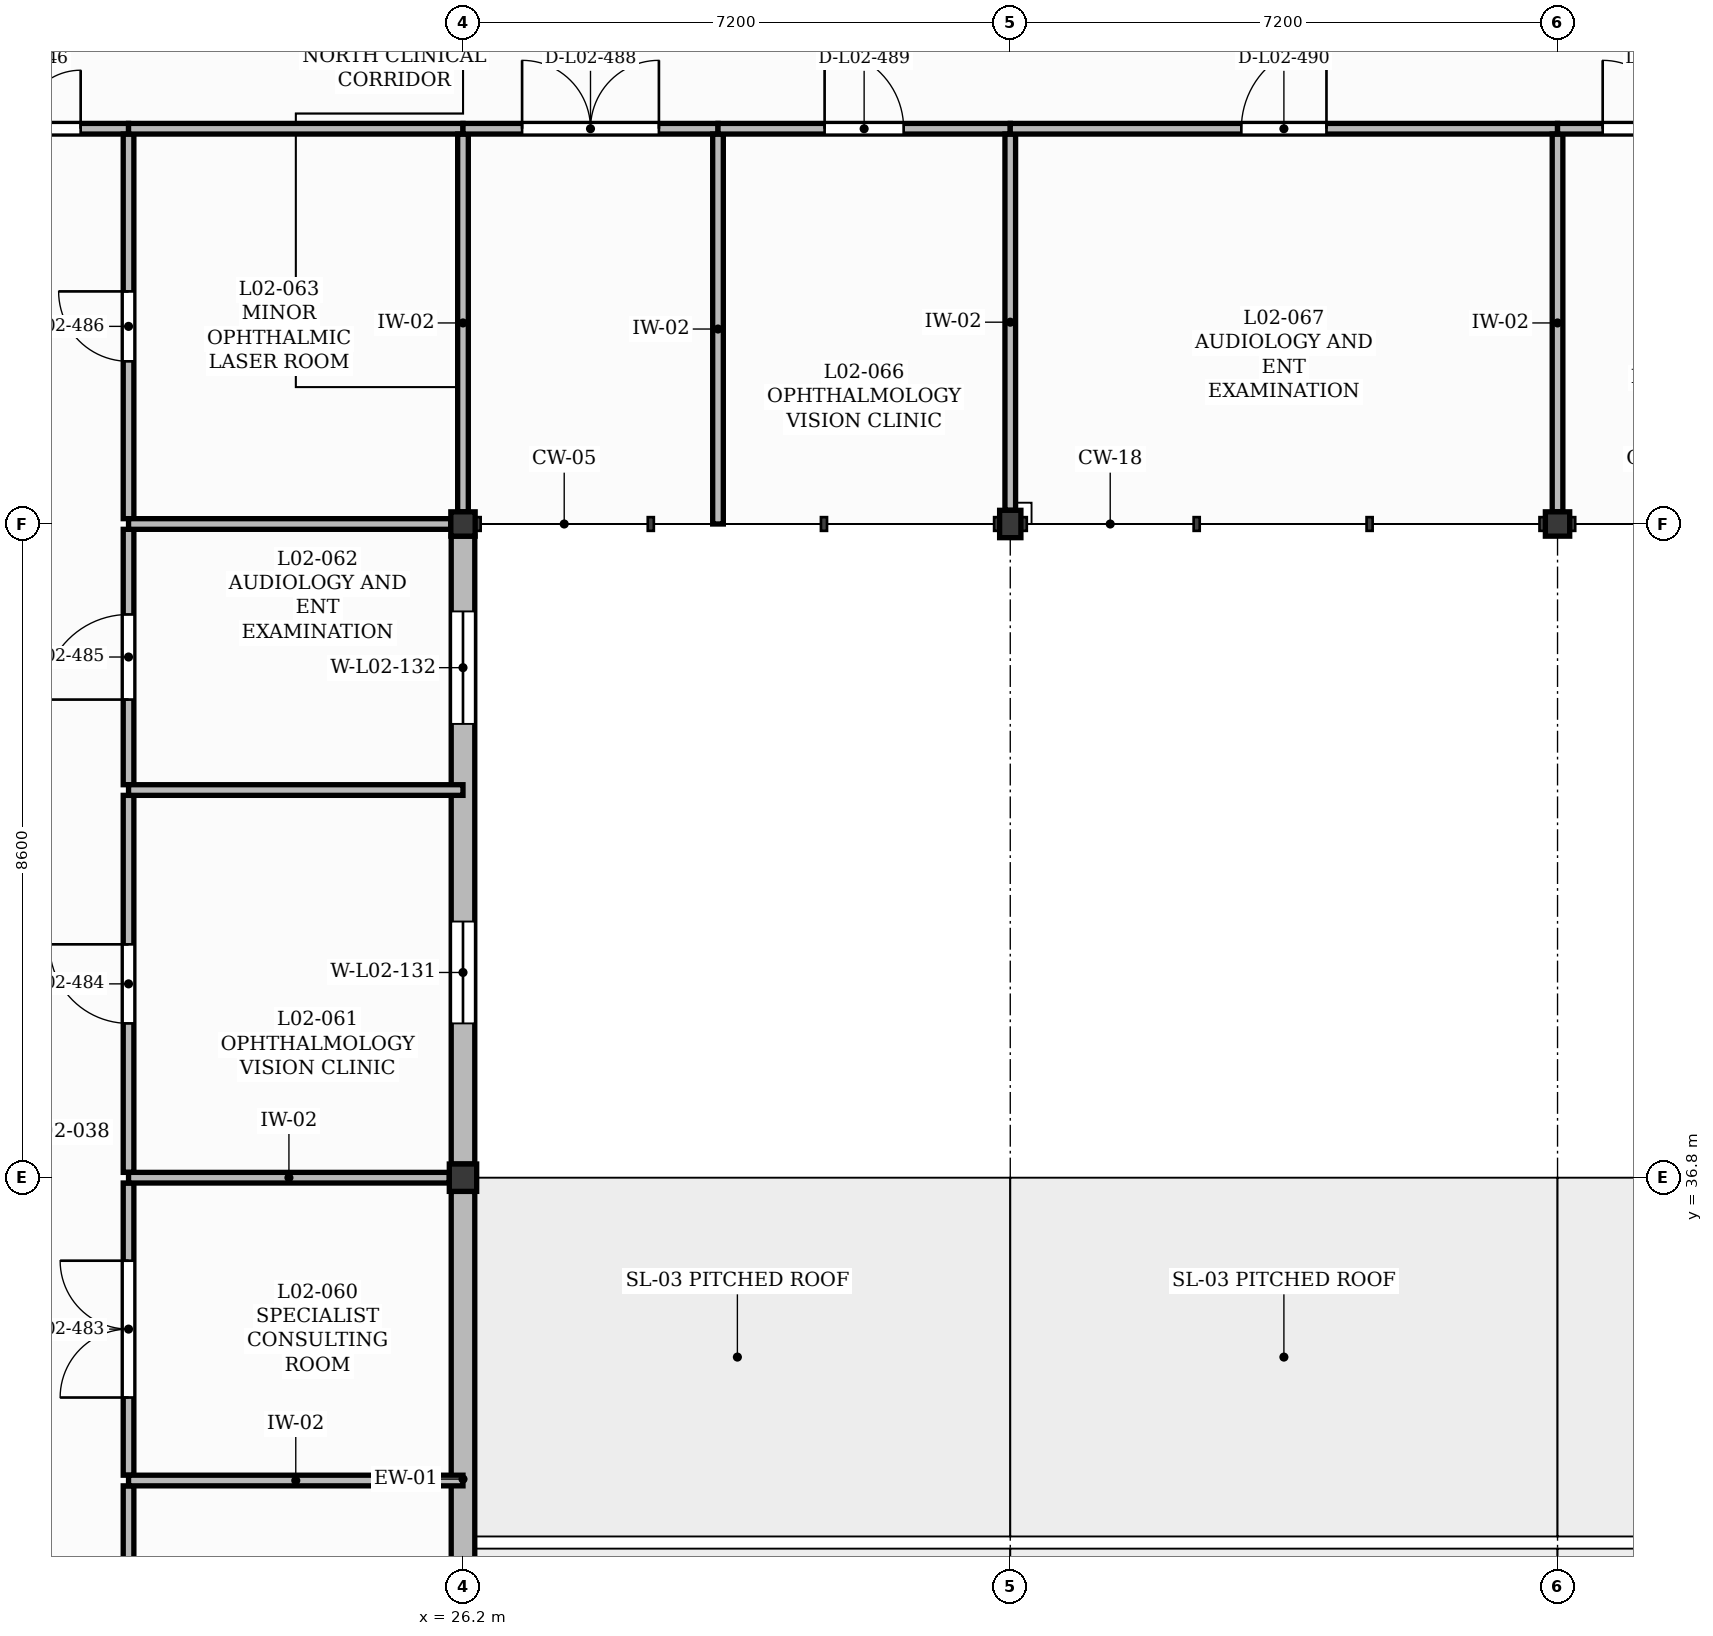
"""IFC4 building model, lengths in metres.
Left out: names, types, materials, properties, quantities, classifications, styles, units other than length and angle.
Written with IfcOpenShell. Run it as: python <this file> out.ifc"""

import sys

from ifc_helpers import new_model, si_unit, direction, frame, frame_2d, origin, origin_2d, place, context, subcontext, project, spatial, rectangle, extrude, element, fill, save


model = new_model("IFC4")
c1 = context("Model", 3, precision=1e-05, world=origin(), true_north=direction((0.0, 1.0)))
c2 = subcontext(c1, "Body", "Model", "MODEL_VIEW")
j1 = project(units=[si_unit("LENGTHUNIT", "METRE"), si_unit("PLANEANGLEUNIT", "RADIAN")], contexts=[c1])
p1 = place(None, origin())
s1 = spatial("IfcSite", under=j1, at=p1, CompositionType="ELEMENT")
p2 = place(p1, origin())
s2 = spatial("IfcBuilding", under=s1, at=p2, CompositionType="ELEMENT")
p3 = place(p2, frame((0.0, 0.0, 9.0)))
s3 = spatial("IfcBuildingStorey", under=s2, at=p3, CompositionType="ELEMENT", Elevation=9.0)
p4 = place(p3, frame((26.2, 36.8, 0.0), z_axis=(0.0, 0.0, 1.0), x_axis=(1.0, 0.0, 0.0)))
e1 = element("IfcColumn", 1, at=p4, inside=s3, PredefinedType="COLUMN", context=c2, shape_type="SweptSolid", body=[
    extrude(rectangle(XDim=0.36, YDim=0.36, at=origin_2d()), origin(), (0.0, 0.0, 1.0), 3.95),
])
p5 = place(p3, frame((26.2, 45.4, 0.0), z_axis=(0.0, 0.0, 1.0), x_axis=(1.0, 0.0, 0.0)))
e2 = element("IfcColumn", 2, at=p5, inside=s3, PredefinedType="COLUMN", context=c2, shape_type="SweptSolid", body=[
    extrude(rectangle(XDim=0.32, YDim=0.32, at=origin_2d()), origin(), (0.0, 0.0, 1.0), 3.95),
])
p6 = place(p3, frame((33.4, 45.4, 0.0), z_axis=(0.0, 0.0, 1.0), x_axis=(1.0, 0.0, 0.0)))
e3 = element("IfcColumn", 3, at=p6, inside=s3, PredefinedType="COLUMN", context=c2, shape_type="SweptSolid", body=[
    extrude(rectangle(XDim=0.28, YDim=0.36, at=origin_2d()), origin(), (0.0, 0.0, 1.0), 3.99),
])
p7 = place(p3, frame((40.6, 45.4, 0.0), z_axis=(0.0, 0.0, 1.0), x_axis=(1.0, 0.0, 0.0)))
e4 = element("IfcColumn", 4, at=p7, inside=s3, PredefinedType="COLUMN", context=c2, shape_type="SweptSolid", body=[
    extrude(rectangle(XDim=0.32, YDim=0.32, at=origin_2d()), origin(), (0.0, 0.0, 1.0), 3.99),
])
p8 = place(p3, frame((26.2, 27.38, 0.0), z_axis=(0.0, 0.0, 1.0), x_axis=(0.0, 1.0, 0.0)))
e5 = element("IfcWall", 5, at=p8, inside=s3, PredefinedType="SOLIDWALL", context=c2, shape_type="SweptSolid", body=[
    extrude(rectangle(XDim=9.24, YDim=0.31, at=frame_2d((4.62, 0.0))), origin(), (0.0, 0.0, 1.0), 3.49),
])
p9 = place(p3, frame((26.2, 36.98, 0.0), z_axis=(0.0, 0.0, 1.0), x_axis=(0.0, 1.0, 0.0)))
e6 = element("IfcWall", 6, at=p9, inside=s3, PredefinedType="SOLIDWALL", context=c2, shape_type="SweptSolid", body=[
    extrude(rectangle(XDim=8.26, YDim=0.31, at=frame_2d((4.13, 0.0))), origin(), (0.0, 0.0, 1.0), 3.49),
])
p10 = place(p9, frame((1.85, 0.0, 1.0)))
e7 = element("IfcOpeningElement", 7, at=p10, cuts=e6, PredefinedType="OPENING", context=c2, shape_type="SweptSolid", body=[
    extrude(rectangle(XDim=1.34, YDim=1.95, at=frame_2d((0.67, 0.975))), frame((0.0, 0.165, 0.0), z_axis=(0.0, -1.0, 0.0), x_axis=(1.0, 0.0, 0.0)), (0.0, 0.0, 1.0), 0.33),
])
p11 = place(p9, frame((5.79, 0.0, 1.0)))
e8 = element("IfcOpeningElement", 8, at=p11, cuts=e6, PredefinedType="OPENING", context=c2, shape_type="SweptSolid", body=[
    extrude(rectangle(XDim=1.48, YDim=1.95, at=frame_2d((0.74, 0.975))), frame((0.0, 0.165, 0.0), z_axis=(0.0, -1.0, 0.0), x_axis=(1.0, 0.0, 0.0)), (0.0, 0.0, 1.0), 0.33),
])
p12 = place(p3, frame((19.0, 50.6, 0.0), z_axis=(0.0, 0.0, 1.0), x_axis=(1.0, 0.0, 0.0)))
e9 = element("IfcWall", 9, at=p12, inside=s3, PredefinedType="PARTITIONING", context=c2, shape_type="SweptSolid", body=[
    extrude(rectangle(XDim=2.8, YDim=0.14, at=frame_2d((1.4, 0.0))), origin(), (0.0, 0.0, 1.0), 3.96),
])
p13 = place(p12, frame((0.63, 0.0, 0.0)))
e10 = element("IfcOpeningElement", 10, at=p13, cuts=e9, PredefinedType="OPENING", context=c2, shape_type="SweptSolid", body=[
    extrude(rectangle(XDim=1.54, YDim=2.25, at=frame_2d((0.77, 1.125))), frame((0.0, 0.08, 0.0), z_axis=(0.0, -1.0, 0.0), x_axis=(1.0, 0.0, 0.0)), (0.0, 0.0, 1.0), 0.16),
])
p14 = place(p3, frame((21.8, 27.27, 0.0), z_axis=(0.0, 0.0, 1.0), x_axis=(0.0, 1.0, 0.0)))
e11 = element("IfcWall", 11, at=p14, inside=s3, PredefinedType="PARTITIONING", context=c2, shape_type="SweptSolid", body=[
    extrude(rectangle(XDim=5.476, YDim=0.14, at=frame_2d((2.738, 0.0))), origin(), (0.0, 0.0, 1.0), 3.96),
])
p15 = place(p14, frame((2.158, 0.0, 0.0)))
e12 = element("IfcOpeningElement", 12, at=p15, cuts=e11, PredefinedType="OPENING", context=c2, shape_type="SweptSolid", body=[
    extrude(rectangle(XDim=1.16, YDim=2.1, at=frame_2d((0.58, 1.05))), frame((0.0, 0.08, 0.0), z_axis=(0.0, -1.0, 0.0), x_axis=(1.0, 0.0, 0.0)), (0.0, 0.0, 1.0), 0.16),
])
p16 = place(p3, frame((21.8, 32.886, 0.0), z_axis=(0.0, 0.0, 1.0), x_axis=(0.0, 1.0, 0.0)))
e13 = element("IfcWall", 13, at=p16, inside=s3, PredefinedType="PARTITIONING", context=c2, shape_type="SweptSolid", body=[
    extrude(rectangle(XDim=3.844, YDim=0.14, at=frame_2d((1.922, 0.0))), origin(), (0.0, 0.0, 1.0), 3.96),
])
p17 = place(p16, frame((1.022, 0.0, 0.0)))
e14 = element("IfcOpeningElement", 14, at=p17, cuts=e13, PredefinedType="OPENING", context=c2, shape_type="SweptSolid", body=[
    extrude(rectangle(XDim=1.8, YDim=2.3, at=frame_2d((0.9, 1.15))), frame((0.0, 0.08, 0.0), z_axis=(0.0, -1.0, 0.0), x_axis=(1.0, 0.0, 0.0)), (0.0, 0.0, 1.0), 0.16),
])
p18 = place(p3, frame((21.8, 32.816, 0.0), z_axis=(0.0, 0.0, 1.0), x_axis=(1.0, 0.0, 0.0)))
e15 = element("IfcWall", 15, at=p18, inside=s3, PredefinedType="PARTITIONING", context=c2, shape_type="SweptSolid", body=[
    extrude(rectangle(XDim=4.4, YDim=0.14, at=frame_2d((2.2, 0.0))), origin(), (0.0, 0.0, 1.0), 3.96),
])
p19 = place(p3, frame((21.8, 36.87, 0.0), z_axis=(0.0, 0.0, 1.0), x_axis=(0.0, 1.0, 0.0)))
e16 = element("IfcWall", 16, at=p19, inside=s3, PredefinedType="PARTITIONING", context=c2, shape_type="SweptSolid", body=[
    extrude(rectangle(XDim=4.96, YDim=0.14, at=frame_2d((2.48, 0.0))), origin(), (0.0, 0.0, 1.0), 3.96),
])
p20 = place(p19, frame((1.96, 0.0, 0.0)))
e17 = element("IfcOpeningElement", 17, at=p20, cuts=e16, PredefinedType="OPENING", context=c2, shape_type="SweptSolid", body=[
    extrude(rectangle(XDim=1.04, YDim=2.1, at=frame_2d((0.52, 1.05))), frame((0.0, 0.08, 0.0), z_axis=(0.0, -1.0, 0.0), x_axis=(1.0, 0.0, 0.0)), (0.0, 0.0, 1.0), 0.16),
])
p21 = place(p3, frame((21.8, 36.8, 0.0), z_axis=(0.0, 0.0, 1.0), x_axis=(1.0, 0.0, 0.0)))
e18 = element("IfcWall", 18, at=p21, inside=s3, PredefinedType="PARTITIONING", context=c2, shape_type="SweptSolid", body=[
    extrude(rectangle(XDim=4.22, YDim=0.14, at=frame_2d((2.11, 0.0))), origin(), (0.0, 0.0, 1.0), 3.49),
])
p22 = place(p3, frame((21.8, 41.97, 0.0), z_axis=(0.0, 0.0, 1.0), x_axis=(0.0, 1.0, 0.0)))
e19 = element("IfcWall", 19, at=p22, inside=s3, PredefinedType="PARTITIONING", context=c2, shape_type="SweptSolid", body=[
    extrude(rectangle(XDim=3.36, YDim=0.14, at=frame_2d((1.68, 0.0))), origin(), (0.0, 0.0, 1.0), 3.96),
])
p23 = place(p22, frame((1.12, 0.0, 0.0)))
e20 = element("IfcOpeningElement", 20, at=p23, cuts=e19, PredefinedType="OPENING", context=c2, shape_type="SweptSolid", body=[
    extrude(rectangle(XDim=1.12, YDim=2.15, at=frame_2d((0.56, 1.075))), frame((0.0, 0.08, 0.0), z_axis=(0.0, -1.0, 0.0), x_axis=(1.0, 0.0, 0.0)), (0.0, 0.0, 1.0), 0.16),
])
p24 = place(p3, frame((21.8, 41.9, 0.0), z_axis=(0.0, 0.0, 1.0), x_axis=(1.0, 0.0, 0.0)))
e21 = element("IfcWall", 21, at=p24, inside=s3, PredefinedType="PARTITIONING", context=c2, shape_type="SweptSolid", body=[
    extrude(rectangle(XDim=4.4, YDim=0.14, at=frame_2d((2.2, 0.0))), origin(), (0.0, 0.0, 1.0), 3.96),
])
p25 = place(p3, frame((21.8, 45.47, 0.0), z_axis=(0.0, 0.0, 1.0), x_axis=(0.0, 1.0, 0.0)))
e22 = element("IfcWall", 22, at=p25, inside=s3, PredefinedType="PARTITIONING", context=c2, shape_type="SweptSolid", body=[
    extrude(rectangle(XDim=5.06, YDim=0.14, at=frame_2d((2.53, 0.0))), origin(), (0.0, 0.0, 1.0), 3.96),
])
p26 = place(p25, frame((2.07, 0.0, 0.0)))
e23 = element("IfcOpeningElement", 23, at=p26, cuts=e22, PredefinedType="OPENING", context=c2, shape_type="SweptSolid", body=[
    extrude(rectangle(XDim=0.92, YDim=2.1, at=frame_2d((0.46, 1.05))), frame((0.0, 0.08, 0.0), z_axis=(0.0, -1.0, 0.0), x_axis=(1.0, 0.0, 0.0)), (0.0, 0.0, 1.0), 0.16),
])
p27 = place(p3, frame((21.8, 45.4, 0.0), z_axis=(0.0, 0.0, 1.0), x_axis=(1.0, 0.0, 0.0)))
e24 = element("IfcWall", 24, at=p27, inside=s3, PredefinedType="PARTITIONING", context=c2, shape_type="SweptSolid", body=[
    extrude(rectangle(XDim=4.24, YDim=0.14, at=frame_2d((2.12, 0.0))), origin(), (0.0, 0.0, 1.0), 3.49),
])
p28 = place(p3, frame((21.8, 50.6, 0.0), z_axis=(0.0, 0.0, 1.0), x_axis=(1.0, 0.0, 0.0)))
e25 = element("IfcWall", 25, at=p28, inside=s3, PredefinedType="PARTITIONING", context=c2, shape_type="SweptSolid", body=[
    extrude(rectangle(XDim=4.4, YDim=0.14, at=frame_2d((2.2, 0.0))), origin(), (0.0, 0.0, 1.0), 3.96),
])
p29 = place(p3, frame((26.2, 45.56, 0.0), z_axis=(0.0, 0.0, 1.0), x_axis=(0.0, 1.0, 0.0)))
e26 = element("IfcWall", 26, at=p29, inside=s3, PredefinedType="PARTITIONING", context=c2, shape_type="SweptSolid", body=[
    extrude(rectangle(XDim=4.97, YDim=0.14, at=frame_2d((2.485, 0.0))), origin(), (0.0, 0.0, 1.0), 3.43),
])
p30 = place(p3, frame((26.2, 50.6, 0.0), z_axis=(0.0, 0.0, 1.0), x_axis=(1.0, 0.0, 0.0)))
e27 = element("IfcWall", 27, at=p30, inside=s3, PredefinedType="PARTITIONING", context=c2, shape_type="SweptSolid", body=[
    extrude(rectangle(XDim=3.355, YDim=0.14, at=frame_2d((1.677, 0.0))), origin(), (0.0, 0.0, 1.0), 3.96),
])
p31 = place(p30, frame((0.778, 0.0, 0.0)))
e28 = element("IfcOpeningElement", 28, at=p31, cuts=e27, PredefinedType="OPENING", context=c2, shape_type="SweptSolid", body=[
    extrude(rectangle(XDim=1.8, YDim=2.3, at=frame_2d((0.9, 1.15))), frame((0.0, 0.08, 0.0), z_axis=(0.0, -1.0, 0.0), x_axis=(1.0, 0.0, 0.0)), (0.0, 0.0, 1.0), 0.16),
])
p32 = place(p3, frame((29.555, 45.4, 0.0), z_axis=(0.0, 0.0, 1.0), x_axis=(0.0, 1.0, 0.0)))
e29 = element("IfcWall", 29, at=p32, inside=s3, PredefinedType="PARTITIONING", context=c2, shape_type="SweptSolid", body=[
    extrude(rectangle(XDim=5.13, YDim=0.14, at=frame_2d((2.565, 0.0))), origin(), (0.0, 0.0, 1.0), 3.96),
])
p33 = place(p3, frame((29.555, 50.6, 0.0), z_axis=(0.0, 0.0, 1.0), x_axis=(1.0, 0.0, 0.0)))
e30 = element("IfcWall", 30, at=p33, inside=s3, PredefinedType="PARTITIONING", context=c2, shape_type="SweptSolid", body=[
    extrude(rectangle(XDim=3.845, YDim=0.14, at=frame_2d((1.922, 0.0))), origin(), (0.0, 0.0, 1.0), 3.96),
])
p34 = place(p33, frame((1.403, 0.0, 0.0)))
e31 = element("IfcOpeningElement", 31, at=p34, cuts=e30, PredefinedType="OPENING", context=c2, shape_type="SweptSolid", body=[
    extrude(rectangle(XDim=1.04, YDim=2.1, at=frame_2d((0.52, 1.05))), frame((0.0, 0.08, 0.0), z_axis=(0.0, -1.0, 0.0), x_axis=(1.0, 0.0, 0.0)), (0.0, 0.0, 1.0), 0.16),
])
p35 = place(p3, frame((33.4, 45.58, 0.0), z_axis=(0.0, 0.0, 1.0), x_axis=(0.0, 1.0, 0.0)))
e32 = element("IfcWall", 32, at=p35, inside=s3, PredefinedType="PARTITIONING", context=c2, shape_type="SweptSolid", body=[
    extrude(rectangle(XDim=4.95, YDim=0.14, at=frame_2d((2.475, 0.0))), origin(), (0.0, 0.0, 1.0), 3.47),
])
p36 = place(p3, frame((33.4, 50.6, 0.0), z_axis=(0.0, 0.0, 1.0), x_axis=(1.0, 0.0, 0.0)))
e33 = element("IfcWall", 33, at=p36, inside=s3, PredefinedType="PARTITIONING", context=c2, shape_type="SweptSolid", body=[
    extrude(rectangle(XDim=7.2, YDim=0.14, at=frame_2d((3.6, 0.0))), origin(), (0.0, 0.0, 1.0), 3.96),
])
p37 = place(p36, frame((3.04, 0.0, 0.0)))
e34 = element("IfcOpeningElement", 34, at=p37, cuts=e33, PredefinedType="OPENING", context=c2, shape_type="SweptSolid", body=[
    extrude(rectangle(XDim=1.12, YDim=2.15, at=frame_2d((0.56, 1.075))), frame((0.0, 0.08, 0.0), z_axis=(0.0, -1.0, 0.0), x_axis=(1.0, 0.0, 0.0)), (0.0, 0.0, 1.0), 0.16),
])
p38 = place(p3, frame((40.6, 45.56, 0.0), z_axis=(0.0, 0.0, 1.0), x_axis=(0.0, 1.0, 0.0)))
e35 = element("IfcWall", 35, at=p38, inside=s3, PredefinedType="PARTITIONING", context=c2, shape_type="SweptSolid", body=[
    extrude(rectangle(XDim=4.97, YDim=0.14, at=frame_2d((2.485, 0.0))), origin(), (0.0, 0.0, 1.0), 3.47),
])
p39 = place(p3, frame((40.6, 50.6, 0.0), z_axis=(0.0, 0.0, 1.0), x_axis=(1.0, 0.0, 0.0)))
e36 = element("IfcWall", 36, at=p39, inside=s3, PredefinedType="PARTITIONING", context=c2, shape_type="SweptSolid", body=[
    extrude(rectangle(XDim=2.988, YDim=0.14, at=frame_2d((1.494, 0.0))), origin(), (0.0, 0.0, 1.0), 3.96),
])
p40 = place(p39, frame((0.594, 0.0, 0.0)))
e37 = element("IfcOpeningElement", 37, at=p40, cuts=e36, PredefinedType="OPENING", context=c2, shape_type="SweptSolid", body=[
    extrude(rectangle(XDim=1.8, YDim=2.3, at=frame_2d((0.9, 1.15))), frame((0.0, 0.08, 0.0), z_axis=(0.0, -1.0, 0.0), x_axis=(1.0, 0.0, 0.0)), (0.0, 0.0, 1.0), 0.16),
])
p41 = place(p10, origin())
e38 = element("IfcWindow", 38, at=p41, inside=s3, PartitioningType="SINGLE_PANEL", PredefinedType="WINDOW", context=c2, shape_type="SweptSolid", body=[
    extrude(rectangle(XDim=1.34, YDim=1.95, at=frame_2d((0.67, 0.975))), frame((0.0, 0.03, 0.0), z_axis=(0.0, -1.0, 0.0), x_axis=(1.0, 0.0, 0.0)), (0.0, 0.0, 1.0), 0.06),
])
fill(e7, e38)
p42 = place(p11, origin())
e39 = element("IfcWindow", 39, at=p42, inside=s3, PartitioningType="SINGLE_PANEL", PredefinedType="WINDOW", context=c2, shape_type="SweptSolid", body=[
    extrude(rectangle(XDim=1.48, YDim=1.95, at=frame_2d((0.74, 0.975))), frame((0.0, 0.03, 0.0), z_axis=(0.0, -1.0, 0.0), x_axis=(1.0, 0.0, 0.0)), (0.0, 0.0, 1.0), 0.06),
])
fill(e8, e39)
p43 = place(p13, origin())
e40 = element("IfcDoor", 40, at=p43, inside=s3, OperationType="DOUBLE_DOOR_SINGLE_SWING", PredefinedType="DOOR", context=c2, shape_type="SweptSolid", body=[
    extrude(rectangle(XDim=1.54, YDim=2.25, at=frame_2d((0.77, 1.125))), frame((0.0, 0.025, 0.0), z_axis=(0.0, -1.0, 0.0), x_axis=(1.0, 0.0, 0.0)), (0.0, 0.0, 1.0), 0.05),
])
fill(e10, e40)
p44 = place(p17, origin())
e41 = element("IfcDoor", 41, at=p44, inside=s3, OperationType="DOUBLE_DOOR_SINGLE_SWING", PredefinedType="DOOR", context=c2, shape_type="SweptSolid", body=[
    extrude(rectangle(XDim=1.8, YDim=2.3, at=frame_2d((0.9, 1.15))), frame((0.0, 0.025, 0.0), z_axis=(0.0, -1.0, 0.0), x_axis=(1.0, 0.0, 0.0)), (0.0, 0.0, 1.0), 0.05),
])
fill(e14, e41)
p45 = place(p20, origin())
e42 = element("IfcDoor", 42, at=p45, inside=s3, OperationType="SINGLE_SWING_RIGHT", PredefinedType="DOOR", context=c2, shape_type="SweptSolid", body=[
    extrude(rectangle(XDim=1.04, YDim=2.1, at=frame_2d((0.52, 1.05))), frame((0.0, 0.025, 0.0), z_axis=(0.0, -1.0, 0.0), x_axis=(1.0, 0.0, 0.0)), (0.0, 0.0, 1.0), 0.05),
])
fill(e17, e42)
p46 = place(p23, origin())
e43 = element("IfcDoor", 43, at=p46, inside=s3, OperationType="SINGLE_SWING_LEFT", PredefinedType="DOOR", context=c2, shape_type="SweptSolid", body=[
    extrude(rectangle(XDim=1.12, YDim=2.15, at=frame_2d((0.56, 1.075))), frame((0.0, 0.025, 0.0), z_axis=(0.0, -1.0, 0.0), x_axis=(1.0, 0.0, 0.0)), (0.0, 0.0, 1.0), 0.05),
])
fill(e20, e43)
p47 = place(p26, origin())
e44 = element("IfcDoor", 44, at=p47, inside=s3, OperationType="SINGLE_SWING_RIGHT", PredefinedType="DOOR", context=c2, shape_type="SweptSolid", body=[
    extrude(rectangle(XDim=0.92, YDim=2.1, at=frame_2d((0.46, 1.05))), frame((0.0, 0.025, 0.0), z_axis=(0.0, -1.0, 0.0), x_axis=(1.0, 0.0, 0.0)), (0.0, 0.0, 1.0), 0.05),
])
fill(e23, e44)
p48 = place(p31, origin())
e45 = element("IfcDoor", 45, at=p48, inside=s3, OperationType="DOUBLE_DOOR_SINGLE_SWING", PredefinedType="DOOR", context=c2, shape_type="SweptSolid", body=[
    extrude(rectangle(XDim=1.8, YDim=2.3, at=frame_2d((0.9, 1.15))), frame((0.0, 0.025, 0.0), z_axis=(0.0, -1.0, 0.0), x_axis=(1.0, 0.0, 0.0)), (0.0, 0.0, 1.0), 0.05),
])
fill(e28, e45)
p49 = place(p34, origin())
e46 = element("IfcDoor", 46, at=p49, inside=s3, OperationType="SINGLE_SWING_LEFT", PredefinedType="DOOR", context=c2, shape_type="SweptSolid", body=[
    extrude(rectangle(XDim=1.04, YDim=2.1, at=frame_2d((0.52, 1.05))), frame((0.0, 0.025, 0.0), z_axis=(0.0, -1.0, 0.0), x_axis=(1.0, 0.0, 0.0)), (0.0, 0.0, 1.0), 0.05),
])
fill(e31, e46)
p50 = place(p37, origin())
e47 = element("IfcDoor", 47, at=p50, inside=s3, OperationType="SINGLE_SWING_RIGHT", PredefinedType="DOOR", context=c2, shape_type="SweptSolid", body=[
    extrude(rectangle(XDim=1.12, YDim=2.15, at=frame_2d((0.56, 1.075))), frame((0.0, 0.025, 0.0), z_axis=(0.0, -1.0, 0.0), x_axis=(1.0, 0.0, 0.0)), (0.0, 0.0, 1.0), 0.05),
])
fill(e34, e47)
p51 = place(p40, origin())
e48 = element("IfcDoor", 48, at=p51, inside=s3, OperationType="DOUBLE_DOOR_SINGLE_SWING", PredefinedType="DOOR", context=c2, shape_type="SweptSolid", body=[
    extrude(rectangle(XDim=1.8, YDim=2.3, at=frame_2d((0.9, 1.15))), frame((0.0, 0.025, 0.0), z_axis=(0.0, -1.0, 0.0), x_axis=(1.0, 0.0, 0.0)), (0.0, 0.0, 1.0), 0.05),
])
fill(e37, e48)
save(model, sys.argv[1])
